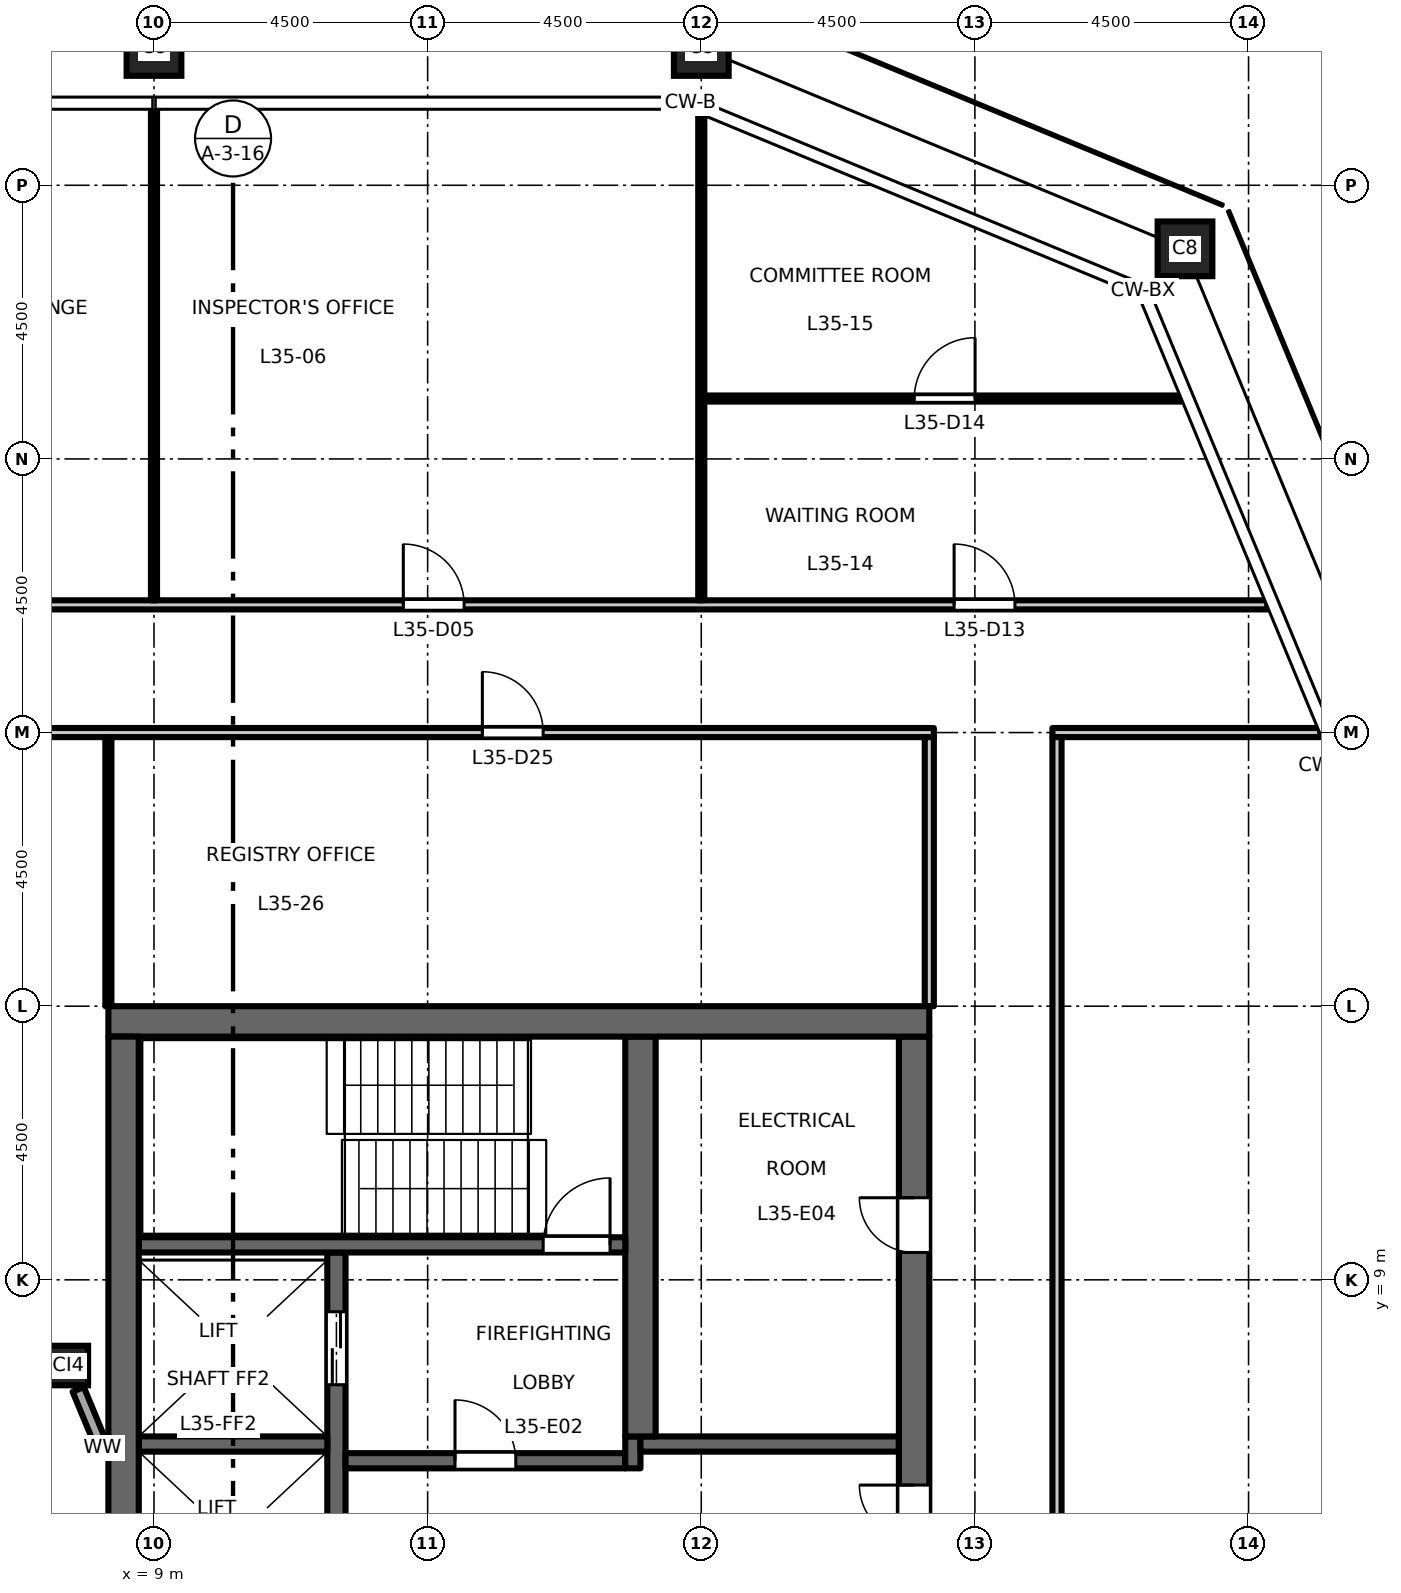
"""IFC4 building model, lengths in metres.
Left out: names, types, materials, properties, quantities, classifications, styles, units other than length and angle.
Written with IfcOpenShell. Run it as: python <this file> out.ifc"""

import sys

from ifc_helpers import new_model, si_unit, direction, frame, frame_2d, origin, origin_2d, place, context, subcontext, project, spatial, rectangle, hollow_rectangle, extrude, element, fill, save


model = new_model("IFC4")
c1 = context("Model", 3, precision=1e-05, world=origin(), true_north=direction((0.0, 1.0)))
c2 = subcontext(c1, "Body", "Model", "MODEL_VIEW")
j1 = project(units=[si_unit("LENGTHUNIT", "METRE"), si_unit("PLANEANGLEUNIT", "RADIAN")], contexts=[c1])
p1 = place(None, origin())
s1 = spatial("IfcSite", under=j1, at=p1, CompositionType="ELEMENT")
p2 = place(p1, origin())
s2 = spatial("IfcBuilding", under=s1, at=p2, CompositionType="ELEMENT")
p3 = place(p2, frame((0.0, 0.0, 163.2)))
s3 = spatial("IfcBuildingStorey", under=s2, at=p3, CompositionType="ELEMENT", Elevation=163.2)
for number, where, z_axis, x_axis in (
    (1, (25.955, 25.955, 0.0), (0.0, 0.0, 1.0), (1.0, 0.0, 0.0)),
    (2, (18.0, 29.25, 0.0), (0.0, 0.0, 1.0), (1.0, 0.0, 0.0)),
    (3, (9.0, 29.25, 0.0), (0.0, 0.0, 1.0), (1.0, 0.0, 0.0)),
):
    element("IfcColumn", number, at=place(p3, frame(where, z_axis=z_axis, x_axis=x_axis)), inside=s3, PredefinedType="COLUMN", context=c2, shape_type="SweptSolid", body=[
        extrude(hollow_rectangle(XDim=0.9, YDim=0.9, WallThickness=0.05, at=origin_2d()), origin(), (0.0, 0.0, 1.0), 4.5),
    ])
p4 = place(p3, frame((7.591, 7.591, 0.0), z_axis=(0.0, 0.0, 1.0), x_axis=(1.0, 0.0, 0.0)))
e4 = element("IfcColumn", 4, at=p4, inside=s3, PredefinedType="COLUMN", context=c2, shape_type="SweptSolid", body=[
    extrude(hollow_rectangle(XDim=0.65, YDim=0.65, WallThickness=0.036, at=origin_2d()), origin(), (0.0, 0.0, 1.0), 4.5),
])
p5 = place(p3, frame((12.0, -9.45, 0.0), z_axis=(0.0, 0.0, 1.0), x_axis=(0.0, 1.0, 0.0)))
e5 = element("IfcWall", 5, at=p5, inside=s3, PredefinedType="SHEAR", context=c2, shape_type="SweptSolid", body=[
    extrude(rectangle(XDim=18.9, YDim=0.3, at=frame_2d((9.45, 0.0))), origin(), (0.0, 0.0, 1.0), 4.35),
])
p6 = place(p5, frame((3.625, 0.0, 0.0)))
e6 = element("IfcOpeningElement", 6, at=p6, cuts=e5, PredefinedType="OPENING", context=c2, shape_type="SweptSolid", body=[
    extrude(rectangle(XDim=1.1, YDim=2.1, at=frame_2d((0.55, 1.05))), frame((0.0, 0.16, 0.0), z_axis=(0.0, -1.0, 0.0), x_axis=(1.0, 0.0, 0.0)), (0.0, 0.0, 1.0), 0.32),
])
p7 = place(p5, frame((6.775, 0.0, 0.0)))
e7 = element("IfcOpeningElement", 7, at=p7, cuts=e5, PredefinedType="OPENING", context=c2, shape_type="SweptSolid", body=[
    extrude(rectangle(XDim=1.1, YDim=2.1, at=frame_2d((0.55, 1.05))), frame((0.0, 0.16, 0.0), z_axis=(0.0, -1.0, 0.0), x_axis=(1.0, 0.0, 0.0)), (0.0, 0.0, 1.0), 0.32),
])
p8 = place(p5, frame((9.925, 0.0, 0.0)))
e8 = element("IfcOpeningElement", 8, at=p8, cuts=e5, PredefinedType="OPENING", context=c2, shape_type="SweptSolid", body=[
    extrude(rectangle(XDim=1.1, YDim=2.1, at=frame_2d((0.55, 1.05))), frame((0.0, 0.16, 0.0), z_axis=(0.0, -1.0, 0.0), x_axis=(1.0, 0.0, 0.0)), (0.0, 0.0, 1.0), 0.32),
])
p9 = place(p5, frame((13.075, 0.0, 0.0)))
e9 = element("IfcOpeningElement", 9, at=p9, cuts=e5, PredefinedType="OPENING", context=c2, shape_type="SweptSolid", body=[
    extrude(rectangle(XDim=1.1, YDim=2.1, at=frame_2d((0.55, 1.05))), frame((0.0, 0.16, 0.0), z_axis=(0.0, -1.0, 0.0), x_axis=(1.0, 0.0, 0.0)), (0.0, 0.0, 1.0), 0.32),
])
p10 = place(p5, frame((16.725, 0.0, 0.0)))
e10 = element("IfcOpeningElement", 10, at=p10, cuts=e5, PredefinedType="OPENING", context=c2, shape_type="SweptSolid", body=[
    extrude(rectangle(XDim=1.2, YDim=2.1, at=frame_2d((0.6, 1.05))), frame((0.0, 0.16, 0.0), z_axis=(0.0, -1.0, 0.0), x_axis=(1.0, 0.0, 0.0)), (0.0, 0.0, 1.0), 0.32),
])
p11 = place(p5, frame((0.975, 0.0, 0.0)))
e11 = element("IfcOpeningElement", 11, at=p11, cuts=e5, PredefinedType="OPENING", context=c2, shape_type="SweptSolid", body=[
    extrude(rectangle(XDim=1.2, YDim=2.1, at=frame_2d((0.6, 1.05))), frame((0.0, 0.16, 0.0), z_axis=(0.0, -1.0, 0.0), x_axis=(1.0, 0.0, 0.0)), (0.0, 0.0, 1.0), 0.32),
])
p12 = place(p3, frame((12.15, 6.025, 0.0), z_axis=(0.0, 0.0, 1.0), x_axis=(1.0, 0.0, 0.0)))
e12 = element("IfcWall", 12, at=p12, inside=s3, PredefinedType="SHEAR", context=c2, shape_type="SweptSolid", body=[
    extrude(rectangle(XDim=4.6, YDim=0.25, at=frame_2d((2.3, 0.0))), origin(), (0.0, 0.0, 1.0), 4.35),
])
p13 = place(p12, frame((1.8, 0.0, 0.0)))
e13 = element("IfcOpeningElement", 13, at=p13, cuts=e12, PredefinedType="OPENING", context=c2, shape_type="SweptSolid", body=[
    extrude(rectangle(XDim=1.0, YDim=2.1, at=frame_2d((0.5, 1.05))), frame((0.0, 0.135, 0.0), z_axis=(0.0, -1.0, 0.0), x_axis=(1.0, 0.0, 0.0)), (0.0, 0.0, 1.0), 0.27),
])
p14 = place(p3, frame((16.875, 5.9, 0.0), z_axis=(0.0, 0.0, 1.0), x_axis=(0.0, 1.0, 0.0)))
e14 = element("IfcWall", 14, at=p14, inside=s3, PredefinedType="SHEAR", context=c2, shape_type="SweptSolid", body=[
    extrude(rectangle(XDim=0.525, YDim=0.25, at=frame_2d((0.263, 0.0))), origin(), (0.0, 0.0, 1.0), 4.35),
])
p15 = place(p3, frame((17.0, 6.3, 0.0), z_axis=(0.0, 0.0, 1.0), x_axis=(1.0, 0.0, 0.0)))
e15 = element("IfcWall", 15, at=p15, inside=s3, PredefinedType="SHEAR", context=c2, shape_type="SweptSolid", body=[
    extrude(rectangle(XDim=4.25, YDim=0.25, at=frame_2d((2.125, 0.0))), origin(), (0.0, 0.0, 1.0), 4.35),
])
p16 = place(p3, frame((21.5, -13.0, 0.0), z_axis=(0.0, 0.0, 1.0), x_axis=(0.0, 1.0, 0.0)))
e16 = element("IfcWall", 16, at=p16, inside=s3, PredefinedType="SHEAR", context=c2, shape_type="SweptSolid", body=[
    extrude(rectangle(XDim=26.0, YDim=0.5, at=frame_2d((13.0, 0.0))), origin(), (0.0, 0.0, 1.0), 4.35),
])
p17 = place(p16, frame((16.825, 0.0, 0.0)))
e17 = element("IfcOpeningElement", 17, at=p17, cuts=e16, PredefinedType="OPENING", context=c2, shape_type="SweptSolid", body=[
    extrude(rectangle(XDim=1.8, YDim=2.1, at=frame_2d((0.9, 1.05))), frame((0.0, 0.26, 0.0), z_axis=(0.0, -1.0, 0.0), x_axis=(1.0, 0.0, 0.0)), (0.0, 0.0, 1.0), 0.52),
])
p18 = place(p16, frame((7.375, 0.0, 0.0)))
e18 = element("IfcOpeningElement", 18, at=p18, cuts=e16, PredefinedType="OPENING", context=c2, shape_type="SweptSolid", body=[
    extrude(rectangle(XDim=1.8, YDim=2.1, at=frame_2d((0.9, 1.05))), frame((0.0, 0.26, 0.0), z_axis=(0.0, -1.0, 0.0), x_axis=(1.0, 0.0, 0.0)), (0.0, 0.0, 1.0), 0.52),
])
p19 = place(p16, frame((22.45, 0.0, 0.0)))
e19 = element("IfcOpeningElement", 19, at=p19, cuts=e16, PredefinedType="OPENING", context=c2, shape_type="SweptSolid", body=[
    extrude(rectangle(XDim=0.9, YDim=2.1, at=frame_2d((0.45, 1.05))), frame((0.0, 0.26, 0.0), z_axis=(0.0, -1.0, 0.0), x_axis=(1.0, 0.0, 0.0)), (0.0, 0.0, 1.0), 0.52),
])
p20 = place(p16, frame((1.7, 0.0, 0.0)))
e20 = element("IfcOpeningElement", 20, at=p20, cuts=e16, PredefinedType="OPENING", context=c2, shape_type="SweptSolid", body=[
    extrude(rectangle(XDim=0.9, YDim=2.1, at=frame_2d((0.45, 1.05))), frame((0.0, 0.26, 0.0), z_axis=(0.0, -1.0, 0.0), x_axis=(1.0, 0.0, 0.0)), (0.0, 0.0, 1.0), 0.52),
])
p21 = place(p3, frame((17.0, 6.425, 0.0), z_axis=(0.0, 0.0, 1.0), x_axis=(0.0, 1.0, 0.0)))
e21 = element("IfcWall", 21, at=p21, inside=s3, PredefinedType="SHEAR", context=c2, shape_type="SweptSolid", body=[
    extrude(rectangle(XDim=6.575, YDim=0.5, at=frame_2d((3.288, 0.0))), origin(), (0.0, 0.0, 1.0), 4.35),
])
p22 = place(p3, frame((8.75, 6.3, 0.0), z_axis=(0.0, 0.0, 1.0), x_axis=(1.0, 0.0, 0.0)))
e22 = element("IfcWall", 22, at=p22, inside=s3, PredefinedType="SHEAR", context=c2, shape_type="SweptSolid", body=[
    extrude(rectangle(XDim=3.1, YDim=0.25, at=frame_2d((1.55, 0.0))), origin(), (0.0, 0.0, 1.0), 4.35),
])
p23 = place(p3, frame((8.75, 9.575, 0.0), z_axis=(0.0, 0.0, 1.0), x_axis=(1.0, 0.0, 0.0)))
e23 = element("IfcWall", 23, at=p23, inside=s3, PredefinedType="SHEAR", context=c2, shape_type="SweptSolid", body=[
    extrude(rectangle(XDim=8.0, YDim=0.25, at=frame_2d((4.0, 0.0))), origin(), (0.0, 0.0, 1.0), 4.35),
])
p24 = place(p23, frame((6.65, 0.0, 0.0)))
e24 = element("IfcOpeningElement", 24, at=p24, cuts=e23, PredefinedType="OPENING", context=c2, shape_type="SweptSolid", body=[
    extrude(rectangle(XDim=1.1, YDim=2.1, at=frame_2d((0.55, 1.05))), frame((0.0, 0.135, 0.0), z_axis=(0.0, -1.0, 0.0), x_axis=(1.0, 0.0, 0.0)), (0.0, 0.0, 1.0), 0.27),
])
p25 = place(p3, frame((8.25, 13.25, 0.0), z_axis=(0.0, 0.0, 1.0), x_axis=(1.0, 0.0, 0.0)))
e25 = element("IfcWall", 25, at=p25, inside=s3, PredefinedType="SHEAR", context=c2, shape_type="SweptSolid", body=[
    extrude(rectangle(XDim=13.5, YDim=0.5, at=frame_2d((6.75, 0.0))), origin(), (0.0, 0.0, 1.0), 4.35),
])
p26 = place(p3, frame((8.5, -13.0, 0.0), z_axis=(0.0, 0.0, 1.0), x_axis=(0.0, 1.0, 0.0)))
e26 = element("IfcWall", 26, at=p26, inside=s3, PredefinedType="SHEAR", context=c2, shape_type="SweptSolid", body=[
    extrude(rectangle(XDim=26.0, YDim=0.5, at=frame_2d((13.0, 0.0))), origin(), (0.0, 0.0, 1.0), 4.35),
])
p27 = place(p3, frame((8.154, 6.231, 0.0), z_axis=(0.0, 0.0, 1.0), x_axis=(-0.382694858887, 0.923874799408, 0.0)))
e27 = element("IfcWall", 27, at=p27, inside=s3, PredefinedType="STANDARD", context=c2, shape_type="SweptSolid", body=[
    extrude(rectangle(XDim=1.048, YDim=0.2, at=frame_2d((0.524, 0.0))), origin(), (0.0, 0.0, 1.0), 3.826),
])
p28 = place(p3, frame((0.0, 18.0, 0.0), z_axis=(0.0, 0.0, 1.0), x_axis=(1.0, 0.0, 0.0)))
e28 = element("IfcWall", 28, at=p28, inside=s3, PredefinedType="PARTITIONING", context=c2, shape_type="SweptSolid", body=[
    extrude(rectangle(XDim=21.825, YDim=0.15, at=frame_2d((10.913, 0.0))), origin(), (0.0, 0.0, 1.0), 4.35),
])
p29 = place(p28, frame((3.65, 0.0, 0.0)))
e29 = element("IfcOpeningElement", 29, at=p29, cuts=e28, PredefinedType="OPENING", context=c2, shape_type="SweptSolid", body=[
    extrude(rectangle(XDim=1.0, YDim=2.1, at=frame_2d((0.5, 1.05))), frame((0.0, 0.085, 0.0), z_axis=(0.0, -1.0, 0.0), x_axis=(1.0, 0.0, 0.0)), (0.0, 0.0, 1.0), 0.17),
])
p30 = place(p28, frame((14.4, 0.0, 0.0)))
e30 = element("IfcOpeningElement", 30, at=p30, cuts=e28, PredefinedType="OPENING", context=c2, shape_type="SweptSolid", body=[
    extrude(rectangle(XDim=1.0, YDim=2.1, at=frame_2d((0.5, 1.05))), frame((0.0, 0.085, 0.0), z_axis=(0.0, -1.0, 0.0), x_axis=(1.0, 0.0, 0.0)), (0.0, 0.0, 1.0), 0.17),
])
p31 = place(p3, frame((23.775, 18.0, 0.0), z_axis=(0.0, 0.0, 1.0), x_axis=(1.0, 0.0, 0.0)))
e31 = element("IfcWall", 31, at=p31, inside=s3, PredefinedType="PARTITIONING", context=c2, shape_type="SweptSolid", body=[
    extrude(rectangle(XDim=4.403, YDim=0.15, at=frame_2d((2.202, 0.0))), origin(), (0.0, 0.0, 1.0), 4.35),
])
p32 = place(p3, frame((-27.308, 20.1, 0.0), z_axis=(0.0, 0.0, 1.0), x_axis=(1.0, 0.0, 0.0)))
e32 = element("IfcWall", 32, at=p32, inside=s3, PredefinedType="PARTITIONING", context=c2, shape_type="SweptSolid", body=[
    extrude(rectangle(XDim=54.616, YDim=0.15, at=frame_2d((27.308, 0.0))), origin(), (0.0, 0.0, 1.0), 4.35),
])
p33 = place(p32, frame((13.408, 0.0, 0.0)))
e33 = element("IfcOpeningElement", 33, at=p33, cuts=e32, PredefinedType="OPENING", context=c2, shape_type="SweptSolid", body=[
    extrude(rectangle(XDim=1.0, YDim=2.1, at=frame_2d((0.5, 1.05))), frame((0.0, 0.085, 0.0), z_axis=(0.0, -1.0, 0.0), x_axis=(1.0, 0.0, 0.0)), (0.0, 0.0, 1.0), 0.17),
])
p34 = place(p32, frame((22.408, 0.0, 0.0)))
e34 = element("IfcOpeningElement", 34, at=p34, cuts=e32, PredefinedType="OPENING", context=c2, shape_type="SweptSolid", body=[
    extrude(rectangle(XDim=1.0, YDim=2.1, at=frame_2d((0.5, 1.05))), frame((0.0, 0.085, 0.0), z_axis=(0.0, -1.0, 0.0), x_axis=(1.0, 0.0, 0.0)), (0.0, 0.0, 1.0), 0.17),
])
p35 = place(p32, frame((31.408, 0.0, 0.0)))
e35 = element("IfcOpeningElement", 35, at=p35, cuts=e32, PredefinedType="OPENING", context=c2, shape_type="SweptSolid", body=[
    extrude(rectangle(XDim=1.0, YDim=2.1, at=frame_2d((0.5, 1.05))), frame((0.0, 0.085, 0.0), z_axis=(0.0, -1.0, 0.0), x_axis=(1.0, 0.0, 0.0)), (0.0, 0.0, 1.0), 0.17),
])
p36 = place(p32, frame((40.408, 0.0, 0.0)))
e36 = element("IfcOpeningElement", 36, at=p36, cuts=e32, PredefinedType="OPENING", context=c2, shape_type="SweptSolid", body=[
    extrude(rectangle(XDim=1.0, YDim=2.1, at=frame_2d((0.5, 1.05))), frame((0.0, 0.085, 0.0), z_axis=(0.0, -1.0, 0.0), x_axis=(1.0, 0.0, 0.0)), (0.0, 0.0, 1.0), 0.17),
])
p37 = place(p32, frame((4.158, 0.0, 0.0)))
e37 = element("IfcOpeningElement", 37, at=p37, cuts=e32, PredefinedType="OPENING", context=c2, shape_type="SweptSolid", body=[
    extrude(rectangle(XDim=1.0, YDim=2.1, at=frame_2d((0.5, 1.05))), frame((0.0, 0.085, 0.0), z_axis=(0.0, -1.0, 0.0), x_axis=(1.0, 0.0, 0.0)), (0.0, 0.0, 1.0), 0.17),
])
p38 = place(p32, frame((49.466, 0.0, 0.0)))
e38 = element("IfcOpeningElement", 38, at=p38, cuts=e32, PredefinedType="OPENING", context=c2, shape_type="SweptSolid", body=[
    extrude(rectangle(XDim=1.0, YDim=2.1, at=frame_2d((0.5, 1.05))), frame((0.0, 0.085, 0.0), z_axis=(0.0, -1.0, 0.0), x_axis=(1.0, 0.0, 0.0)), (0.0, 0.0, 1.0), 0.17),
])
p39 = place(p3, frame((18.05, 23.493, 0.0), z_axis=(0.0, 0.0, 1.0), x_axis=(1.0, 0.0, 0.0)))
e39 = element("IfcWall", 39, at=p39, inside=s3, PredefinedType="PARTITIONING", context=c2, shape_type="SweptSolid", body=[
    extrude(rectangle(XDim=7.853, YDim=0.1, at=frame_2d((3.927, 0.0))), origin(), (0.0, 0.0, 1.0), 4.35),
])
p40 = place(p39, frame((3.453, 0.0, 0.0)))
e40 = element("IfcOpeningElement", 40, at=p40, cuts=e39, PredefinedType="OPENING", context=c2, shape_type="SweptSolid", body=[
    extrude(rectangle(XDim=1.0, YDim=2.1, at=frame_2d((0.5, 1.05))), frame((0.0, 0.06, 0.0), z_axis=(0.0, -1.0, 0.0), x_axis=(1.0, 0.0, 0.0)), (0.0, 0.0, 1.0), 0.12),
])
p41 = place(p3, frame((8.25, 13.5, 0.0), z_axis=(0.0, 0.0, 1.0), x_axis=(0.0, 1.0, 0.0)))
e41 = element("IfcWall", 41, at=p41, inside=s3, PredefinedType="PARTITIONING", context=c2, shape_type="SweptSolid", body=[
    extrude(rectangle(XDim=4.425, YDim=0.1, at=frame_2d((2.212, 0.0))), origin(), (0.0, 0.0, 1.0), 4.35),
])
p42 = place(p3, frame((9.0, 20.175, 0.0), z_axis=(0.0, 0.0, 1.0), x_axis=(0.0, 1.0, 0.0)))
e42 = element("IfcWall", 42, at=p42, inside=s3, PredefinedType="PARTITIONING", context=c2, shape_type="SweptSolid", body=[
    extrude(rectangle(XDim=8.085, YDim=0.1, at=frame_2d((4.042, 0.0))), origin(), (0.0, 0.0, 1.0), 3.45),
])
p43 = place(p3, frame((18.0, 20.175, 0.0), z_axis=(0.0, 0.0, 1.0), x_axis=(0.0, 1.0, 0.0)))
e43 = element("IfcWall", 43, at=p43, inside=s3, PredefinedType="PARTITIONING", context=c2, shape_type="SweptSolid", body=[
    extrude(rectangle(XDim=8.003, YDim=0.1, at=frame_2d((4.001, 0.0))), origin(), (0.0, 0.0, 1.0), 3.45),
])
p44 = place(p3, frame((21.75, 13.5, 0.0), z_axis=(0.0, 0.0, 1.0), x_axis=(0.0, 1.0, 0.0)))
e44 = element("IfcWall", 44, at=p44, inside=s3, PredefinedType="PARTITIONING", context=c2, shape_type="SweptSolid", body=[
    extrude(rectangle(XDim=4.425, YDim=0.15, at=frame_2d((2.212, 0.0))), origin(), (0.0, 0.0, 1.0), 4.35),
])
p45 = place(p3, frame((23.85, -17.925, 0.0), z_axis=(0.0, 0.0, 1.0), x_axis=(0.0, 1.0, 0.0)))
e45 = element("IfcWall", 45, at=p45, inside=s3, PredefinedType="PARTITIONING", context=c2, shape_type="SweptSolid", body=[
    extrude(rectangle(XDim=35.85, YDim=0.15, at=frame_2d((17.925, 0.0))), origin(), (0.0, 0.0, 1.0), 4.35),
])
p46 = place(p45, frame((17.325, 0.0, 0.0)))
e46 = element("IfcOpeningElement", 46, at=p46, cuts=e45, PredefinedType="OPENING", context=c2, shape_type="SweptSolid", body=[
    extrude(rectangle(XDim=1.0, YDim=2.1, at=frame_2d((0.5, 1.05))), frame((0.0, 0.085, 0.0), z_axis=(0.0, -1.0, 0.0), x_axis=(1.0, 0.0, 0.0)), (0.0, 0.0, 1.0), 0.17),
])
p47 = place(p13, origin())
e47 = element("IfcDoor", 47, at=p47, inside=s3, OperationType="SINGLE_SWING_RIGHT", PredefinedType="DOOR", context=c2, shape_type="SweptSolid", body=[
    extrude(rectangle(XDim=1.0, YDim=2.1, at=frame_2d((0.5, 1.05))), frame((0.0, 0.025, 0.0), z_axis=(0.0, -1.0, 0.0), x_axis=(1.0, 0.0, 0.0)), (0.0, 0.0, 1.0), 0.05),
])
fill(e13, e47)
p48 = place(p24, origin())
e48 = element("IfcDoor", 48, at=p48, inside=s3, OperationType="SINGLE_SWING_LEFT", PredefinedType="DOOR", context=c2, shape_type="SweptSolid", body=[
    extrude(rectangle(XDim=1.1, YDim=2.1, at=frame_2d((0.55, 1.05))), frame((0.0, 0.025, 0.0), z_axis=(0.0, -1.0, 0.0), x_axis=(1.0, 0.0, 0.0)), (0.0, 0.0, 1.0), 0.05),
])
fill(e24, e48)
p49 = place(p17, origin())
e49 = element("IfcDoor", 49, at=p49, inside=s3, OperationType="DOUBLE_DOOR_DOUBLE_SWING", PredefinedType="DOOR", context=c2, shape_type="SweptSolid", body=[
    extrude(rectangle(XDim=1.8, YDim=2.1, at=frame_2d((0.9, 1.05))), frame((0.0, 0.025, 0.0), z_axis=(0.0, -1.0, 0.0), x_axis=(1.0, 0.0, 0.0)), (0.0, 0.0, 1.0), 0.05),
])
fill(e17, e49)
p50 = place(p10, origin())
e50 = element("IfcDoor", 50, at=p50, inside=s3, OperationType="DOUBLE_DOOR_SLIDING", PredefinedType="DOOR", context=c2, shape_type="SweptSolid", body=[
    extrude(rectangle(XDim=1.2, YDim=2.1, at=frame_2d((0.6, 1.05))), frame((0.0, 0.025, 0.0), z_axis=(0.0, -1.0, 0.0), x_axis=(1.0, 0.0, 0.0)), (0.0, 0.0, 1.0), 0.05),
])
fill(e10, e50)
p51 = place(p19, origin())
e51 = element("IfcDoor", 51, at=p51, inside=s3, OperationType="SINGLE_SWING_LEFT", PredefinedType="DOOR", context=c2, shape_type="SweptSolid", body=[
    extrude(rectangle(XDim=0.9, YDim=2.1, at=frame_2d((0.45, 1.05))), frame((0.0, 0.025, 0.0), z_axis=(0.0, -1.0, 0.0), x_axis=(1.0, 0.0, 0.0)), (0.0, 0.0, 1.0), 0.05),
])
fill(e19, e51)
p52 = place(p36, origin())
e52 = element("IfcDoor", 52, at=p52, inside=s3, OperationType="SINGLE_SWING_LEFT", PredefinedType="DOOR", context=c2, shape_type="SweptSolid", body=[
    extrude(rectangle(XDim=1.0, YDim=2.1, at=frame_2d((0.5, 1.05))), frame((0.0, 0.025, 0.0), z_axis=(0.0, -1.0, 0.0), x_axis=(1.0, 0.0, 0.0)), (0.0, 0.0, 1.0), 0.05),
])
fill(e36, e52)
p53 = place(p38, origin())
e53 = element("IfcDoor", 53, at=p53, inside=s3, OperationType="SINGLE_SWING_LEFT", PredefinedType="DOOR", context=c2, shape_type="SweptSolid", body=[
    extrude(rectangle(XDim=1.0, YDim=2.1, at=frame_2d((0.5, 1.05))), frame((0.0, 0.025, 0.0), z_axis=(0.0, -1.0, 0.0), x_axis=(1.0, 0.0, 0.0)), (0.0, 0.0, 1.0), 0.05),
])
fill(e38, e53)
p54 = place(p40, origin())
e54 = element("IfcDoor", 54, at=p54, inside=s3, OperationType="SINGLE_SWING_RIGHT", PredefinedType="DOOR", context=c2, shape_type="SweptSolid", body=[
    extrude(rectangle(XDim=1.0, YDim=2.1, at=frame_2d((0.5, 1.05))), frame((0.0, 0.025, 0.0), z_axis=(0.0, -1.0, 0.0), x_axis=(1.0, 0.0, 0.0)), (0.0, 0.0, 1.0), 0.05),
])
fill(e40, e54)
p55 = place(p30, origin())
e55 = element("IfcDoor", 55, at=p55, inside=s3, OperationType="SINGLE_SWING_LEFT", PredefinedType="DOOR", context=c2, shape_type="SweptSolid", body=[
    extrude(rectangle(XDim=1.0, YDim=2.1, at=frame_2d((0.5, 1.05))), frame((0.0, 0.025, 0.0), z_axis=(0.0, -1.0, 0.0), x_axis=(1.0, 0.0, 0.0)), (0.0, 0.0, 1.0), 0.05),
])
fill(e30, e55)
save(model, sys.argv[1])
